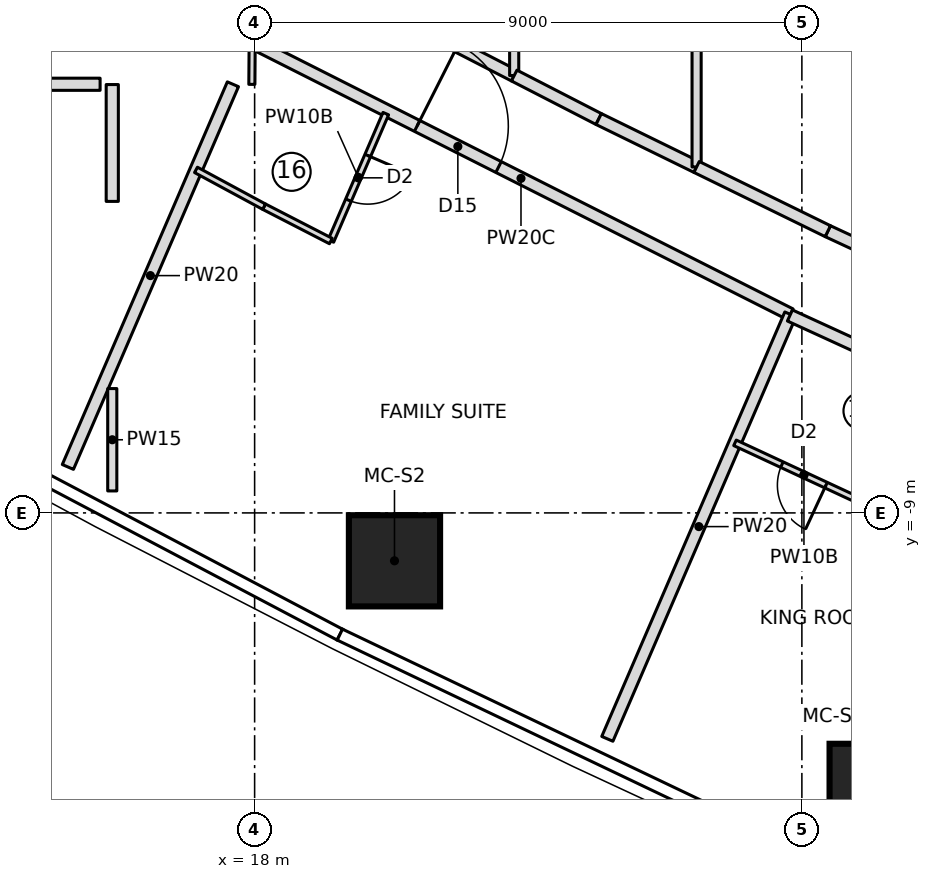
"""IFC4 building model, lengths in metres.
Left out: names, types, materials, properties, quantities, classifications, styles, units other than length and angle.
Written with IfcOpenShell. Run it as: python <this file> out.ifc"""

import sys

from ifc_helpers import new_model, si_unit, direction, frame, frame_2d, origin, origin_2d, place, context, subcontext, project, spatial, rectangle, extrude, element, fill, save


model = new_model("IFC4")
c1 = context("Model", 3, precision=1e-05, world=origin(), true_north=direction((0.0, 1.0)))
c2 = subcontext(c1, "Body", "Model", "MODEL_VIEW")
j1 = project(units=[si_unit("LENGTHUNIT", "METRE"), si_unit("PLANEANGLEUNIT", "RADIAN")], contexts=[c1])
p1 = place(None, origin())
s1 = spatial("IfcSite", under=j1, at=p1, CompositionType="ELEMENT")
p2 = place(p1, origin())
s2 = spatial("IfcBuilding", under=s1, at=p2, CompositionType="ELEMENT")
p3 = place(p2, frame((0.0, 0.0, 133.75)))
s3 = spatial("IfcBuildingStorey", under=s2, at=p3, CompositionType="ELEMENT", Elevation=133.75)
for number, where, z_axis, x_axis in (
    (1, (20.3, -9.788, 0.0), (0.0, 0.0, 1.0), (1.0, 0.0, 0.0)),
    (2, (28.205, -13.547, 0.0), (0.0, 0.0, 1.0), (1.0, 0.0, 0.0)),
):
    element("IfcColumn", number, at=place(p3, frame(where, z_axis=z_axis, x_axis=x_axis)), inside=s3, PredefinedType="COLUMN", context=c2, shape_type="SweptSolid", body=[
        extrude(rectangle(XDim=1.5, YDim=1.5, at=origin_2d()), origin(), (0.0, 0.0, 1.0), 3.55),
    ])
p4 = place(p3, frame((5.654, -1.95, 0.0), z_axis=(0.0, 0.0, 1.0), x_axis=(1.0, 0.0, 0.0)))
e3 = element("IfcWall", 3, at=p4, inside=s3, PredefinedType="PARTITIONING", context=c2, shape_type="SweptSolid", body=[
    extrude(rectangle(XDim=9.804, YDim=0.2, at=frame_2d((4.902, 0.0))), origin(), (0.0, 0.0, 1.0), 3.25),
])
p5 = place(p4, frame((4.618, 0.0, 0.0)))
e4 = element("IfcOpeningElement", 4, at=p5, cuts=e3, PredefinedType="OPENING", context=c2, shape_type="SweptSolid", body=[
    extrude(rectangle(XDim=1.0, YDim=2.1, at=frame_2d((0.5, 1.05))), frame((0.0, 0.11, 0.0), z_axis=(0.0, -1.0, 0.0), x_axis=(1.0, 0.0, 0.0)), (0.0, 0.0, 1.0), 0.22),
])
p6 = place(p3, frame((14.929, -8.244, 0.0), z_axis=(0.0, 0.0, 1.0), x_axis=(0.395994543879, 0.918252863441, 0.0)))
e5 = element("IfcWall", 5, at=p6, inside=s3, PredefinedType="PARTITIONING", context=c2, shape_type="SweptSolid", body=[
    extrude(rectangle(XDim=6.854, YDim=0.2, at=frame_2d((3.427, 0.0))), origin(), (0.0, 0.0, 1.0), 3.25),
])
p7 = place(p3, frame((17.95, -1.261, 0.0), z_axis=(0.0, 0.0, 1.0), x_axis=(0.892679126003, -0.450692775623, 0.0)))
e6 = element("IfcWall", 6, at=p7, inside=s3, PredefinedType="PARTITIONING", context=c2, shape_type="SweptSolid", body=[
    extrude(rectangle(XDim=9.927, YDim=0.2, at=frame_2d((4.963, 0.0))), origin(), (0.0, 0.0, 1.0), 3.25),
])
p8 = place(p7, frame((3.05, 0.0, 0.0)))
e7 = element("IfcOpeningElement", 7, at=p8, cuts=e6, PredefinedType="OPENING", context=c2, shape_type="SweptSolid", body=[
    extrude(rectangle(XDim=1.5, YDim=2.1, at=frame_2d((0.75, 1.05))), frame((0.0, 0.11, 0.0), z_axis=(0.0, -1.0, 0.0), x_axis=(1.0, 0.0, 0.0)), (0.0, 0.0, 1.0), 0.22),
])
p9 = place(p3, frame((20.157, -2.433, 0.0), z_axis=(0.0, 0.0, 1.0), x_axis=(-0.395958457437, -0.9182684248, 0.0)))
e8 = element("IfcWall", 8, at=p9, inside=s3, PredefinedType="PARTITIONING", context=c2, shape_type="SweptSolid", body=[
    extrude(rectangle(XDim=2.282, YDim=0.1, at=frame_2d((1.141, 0.0))), origin(), (0.0, 0.0, 1.0), 3.25),
])
p10 = place(p9, frame((0.75, 0.0, 0.0)))
e9 = element("IfcOpeningElement", 9, at=p10, cuts=e8, PredefinedType="OPENING", context=c2, shape_type="SweptSolid", body=[
    extrude(rectangle(XDim=0.8, YDim=2.1, at=frame_2d((0.4, 1.05))), frame((0.0, 0.06, 0.0), z_axis=(0.0, -1.0, 0.0), x_axis=(1.0, 0.0, 0.0)), (0.0, 0.0, 1.0), 0.12),
])
p11 = place(p3, frame((19.253, -4.529, 0.0), z_axis=(0.0, 0.0, 1.0), x_axis=(-0.889106231322, 0.457700895154, 0.0)))
e10 = element("IfcWall", 10, at=p11, inside=s3, PredefinedType="PARTITIONING", context=c2, shape_type="SweptSolid", body=[
    extrude(rectangle(XDim=1.235, YDim=0.1, at=frame_2d((0.617, 0.0))), origin(), (0.0, 0.0, 1.0), 3.25),
])
p12 = place(p3, frame((18.156, -3.963, 0.0), z_axis=(0.0, 0.0, 1.0), x_axis=(-0.879823588489, 0.475300382009, 0.0)))
e11 = element("IfcWall", 11, at=p12, inside=s3, PredefinedType="PARTITIONING", context=c2, shape_type="SweptSolid", body=[
    extrude(rectangle(XDim=1.273, YDim=0.1, at=frame_2d((0.636, 0.0))), origin(), (0.0, 0.0, 1.0), 3.25),
])
p13 = place(p3, frame((23.801, -12.716, 0.0), z_axis=(0.0, 0.0, 1.0), x_axis=(0.395995556294, 0.918252426839, 0.0)))
e12 = element("IfcWall", 12, at=p13, inside=s3, PredefinedType="PARTITIONING", context=c2, shape_type="SweptSolid", body=[
    extrude(rectangle(XDim=7.603, YDim=0.2, at=frame_2d((3.802, 0.0))), origin(), (0.0, 0.0, 1.0), 3.25),
])
p14 = place(p3, frame((26.803, -5.753, 0.0), z_axis=(0.0, 0.0, 1.0), x_axis=(0.90910092787, -0.416575926987, 0.0)))
e13 = element("IfcWall", 13, at=p14, inside=s3, PredefinedType="PARTITIONING", context=c2, shape_type="SweptSolid", body=[
    extrude(rectangle(XDim=4.375, YDim=0.2, at=frame_2d((2.188, 0.0))), origin(), (0.0, 0.0, 1.0), 3.25),
])
p15 = place(p14, frame((3.05, 0.0, 0.0)))
e14 = element("IfcOpeningElement", 14, at=p15, cuts=e13, PredefinedType="OPENING", context=c2, shape_type="SweptSolid", body=[
    extrude(rectangle(XDim=1.0, YDim=2.1, at=frame_2d((0.5, 1.05))), frame((0.0, 0.11, 0.0), z_axis=(0.0, -1.0, 0.0), x_axis=(1.0, 0.0, 0.0)), (0.0, 0.0, 1.0), 0.22),
])
p16 = place(p3, frame((28.168, -8.902, 0.0), z_axis=(0.0, 0.0, 1.0), x_axis=(-0.906813113059, 0.421532890751, 0.0)))
e15 = element("IfcWall", 15, at=p16, inside=s3, PredefinedType="PARTITIONING", context=c2, shape_type="SweptSolid", body=[
    extrude(rectangle(XDim=2.501, YDim=0.1, at=frame_2d((1.25, 0.0))), origin(), (0.0, 0.0, 1.0), 3.25),
])
p17 = place(p16, frame((0.85, 0.0, 0.0)))
e16 = element("IfcOpeningElement", 16, at=p17, cuts=e15, PredefinedType="OPENING", context=c2, shape_type="SweptSolid", body=[
    extrude(rectangle(XDim=0.8, YDim=2.1, at=frame_2d((0.4, 1.05))), frame((0.0, 0.06, 0.0), z_axis=(0.0, -1.0, 0.0), x_axis=(1.0, 0.0, 0.0)), (0.0, 0.0, 1.0), 0.12),
])
p18 = place(p3, frame((27.771, -14.554, 0.0), z_axis=(0.0, 0.0, 1.0), x_axis=(0.396004020147, 0.918248776763, 0.0)))
e17 = element("IfcWall", 17, at=p18, inside=s3, PredefinedType="PARTITIONING", context=c2, shape_type="SweptSolid", body=[
    extrude(rectangle(XDim=7.6, YDim=0.2, at=frame_2d((3.8, 0.0))), origin(), (0.0, 0.0, 1.0), 3.25),
])
p19 = place(p3, frame((22.269, -1.807, 0.0), z_axis=(0.0, 0.0, 1.0), x_axis=(-0.889134700325, 0.457645588505, 0.0)))
e18 = element("IfcWall", 18, at=p19, inside=s3, PredefinedType="PARTITIONING", context=c2, shape_type="SweptSolid", body=[
    extrude(rectangle(XDim=2.632, YDim=0.2, at=frame_2d((1.316, 0.0))), origin(), (0.0, 0.0, 1.0), 3.25),
])
p20 = place(p3, frame((22.269, -1.807, 0.0), z_axis=(0.0, 0.0, 1.0), x_axis=(0.0, 1.0, 0.0)))
e19 = element("IfcWall", 19, at=p20, inside=s3, PredefinedType="PARTITIONING", context=c2, shape_type="SweptSolid", body=[
    extrude(rectangle(XDim=3.613, YDim=0.15, at=frame_2d((1.807, 0.0))), origin(), (0.0, 0.0, 1.0), 3.25),
])
p21 = place(p3, frame((23.659, -2.522, 0.0), z_axis=(0.0, 0.0, 1.0), x_axis=(-0.88914982879, 0.457616195039, 0.0)))
e20 = element("IfcWall", 20, at=p21, inside=s3, PredefinedType="PARTITIONING", context=c2, shape_type="SweptSolid", body=[
    extrude(rectangle(XDim=1.563, YDim=0.2, at=frame_2d((0.782, 0.0))), origin(), (0.0, 0.0, 1.0), 3.25),
])
p22 = place(p3, frame((25.269, -3.31, 0.0), z_axis=(0.0, 0.0, 1.0), x_axis=(-0.898127473276, 0.439735195028, 0.0)))
e21 = element("IfcWall", 21, at=p22, inside=s3, PredefinedType="PARTITIONING", context=c2, shape_type="SweptSolid", body=[
    extrude(rectangle(XDim=1.793, YDim=0.2, at=frame_2d((0.896, 0.0))), origin(), (0.0, 0.0, 1.0), 3.25),
])
p23 = place(p3, frame((25.269, -3.31, 0.0), z_axis=(0.0, 0.0, 1.0), x_axis=(0.0, 1.0, 0.0)))
e22 = element("IfcWall", 22, at=p23, inside=s3, PredefinedType="PARTITIONING", context=c2, shape_type="SweptSolid", body=[
    extrude(rectangle(XDim=6.621, YDim=0.15, at=frame_2d((3.31, 0.0))), origin(), (0.0, 0.0, 1.0), 3.25),
])
p24 = place(p3, frame((31.231, -6.135, 0.0), z_axis=(0.0, 0.0, 1.0), x_axis=(-0.906830275285, 0.421495968933, 0.0)))
e23 = element("IfcWall", 23, at=p24, inside=s3, PredefinedType="PARTITIONING", context=c2, shape_type="SweptSolid", body=[
    extrude(rectangle(XDim=4.195, YDim=0.2, at=frame_2d((2.098, 0.0))), origin(), (0.0, 0.0, 1.0), 3.25),
])
p25 = place(p3, frame((27.427, -4.367, 0.0), z_axis=(0.0, 0.0, 1.0), x_axis=(-0.898155255728, 0.439678446831, 0.0)))
e24 = element("IfcWall", 24, at=p25, inside=s3, PredefinedType="PARTITIONING", context=c2, shape_type="SweptSolid", body=[
    extrude(rectangle(XDim=2.403, YDim=0.2, at=frame_2d((1.201, 0.0))), origin(), (0.0, 0.0, 1.0), 3.25),
])
p26 = place(p3, frame((15.659, -6.955, 0.0), z_axis=(0.0, 0.0, 1.0), x_axis=(0.0, -1.0, 0.0)))
e25 = element("IfcWall", 25, at=p26, inside=s3, PredefinedType="PARTITIONING", context=c2, shape_type="SweptSolid", body=[
    extrude(rectangle(XDim=1.684, YDim=0.15, at=frame_2d((0.842, 0.0))), origin(), (0.0, 0.0, 1.0), 3.25),
])
p27 = place(p3, frame((17.955, -1.952, 0.0), z_axis=(0.0, 0.0, 1.0), x_axis=(0.007291472831, 0.999973416859, 0.0)))
e26 = element("IfcWall", 26, at=p27, inside=s3, PredefinedType="PARTITIONING", context=c2, shape_type="SweptSolid", body=[
    extrude(rectangle(XDim=0.703, YDim=0.1, at=frame_2d((0.352, 0.0))), origin(), (0.0, 0.0, 1.0), 3.25),
])
p28 = place(p3, frame((15.659, -1.955, 0.0), z_axis=(0.0, 0.0, 1.0), x_axis=(0.0, -1.0, 0.0)))
e27 = element("IfcWall", 27, at=p28, inside=s3, PredefinedType="PARTITIONING", context=c2, shape_type="SweptSolid", body=[
    extrude(rectangle(XDim=1.922, YDim=0.2, at=frame_2d((0.961, 0.0))), origin(), (0.0, 0.0, 1.0), 3.25),
])
p29 = place(p10, origin())
e28 = element("IfcDoor", 28, at=p29, inside=s3, OperationType="SINGLE_SWING_LEFT", PredefinedType="DOOR", context=c2, shape_type="SweptSolid", body=[
    extrude(rectangle(XDim=0.8, YDim=2.1, at=frame_2d((0.4, 1.05))), frame((0.0, 0.025, 0.0), z_axis=(0.0, -1.0, 0.0), x_axis=(1.0, 0.0, 0.0)), (0.0, 0.0, 1.0), 0.05),
])
fill(e9, e28)
p30 = place(p8, origin())
e29 = element("IfcDoor", 29, at=p30, inside=s3, OperationType="DOUBLE_DOOR_SINGLE_SWING", PredefinedType="DOOR", context=c2, shape_type="SweptSolid", body=[
    extrude(rectangle(XDim=1.5, YDim=2.1, at=frame_2d((0.75, 1.05))), frame((0.0, 0.025, 0.0), z_axis=(0.0, -1.0, 0.0), x_axis=(1.0, 0.0, 0.0)), (0.0, 0.0, 1.0), 0.05),
])
fill(e7, e29)
p31 = place(p17, origin())
e30 = element("IfcDoor", 30, at=p31, inside=s3, OperationType="SINGLE_SWING_LEFT", PredefinedType="DOOR", context=c2, shape_type="SweptSolid", body=[
    extrude(rectangle(XDim=0.8, YDim=2.1, at=frame_2d((0.4, 1.05))), frame((0.0, 0.025, 0.0), z_axis=(0.0, -1.0, 0.0), x_axis=(1.0, 0.0, 0.0)), (0.0, 0.0, 1.0), 0.05),
])
fill(e16, e30)
save(model, sys.argv[1])
